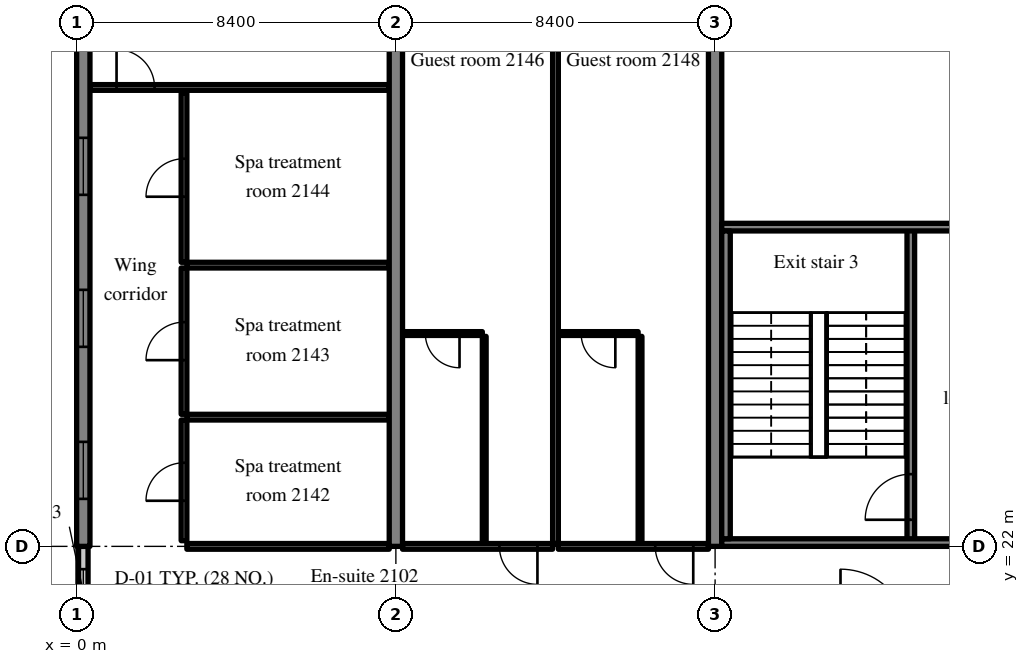
"""IFC4 building model, lengths in metres.
Left out: names, types, materials, properties, quantities, classifications, styles, units other than length and angle.
Written with IfcOpenShell. Run it as: python <this file> out.ifc"""

import sys

from ifc_helpers import new_model, si_unit, direction, frame, frame_2d, origin, place, context, subcontext, project, spatial, rectangle, extrude, source, transform, mapped, element, fill, save


model = new_model("IFC4")
c1 = context("Model", 3, precision=1e-05, world=origin(), true_north=direction((0.0, 1.0)))
c2 = subcontext(c1, "Body", "Model", "MODEL_VIEW")
j1 = project(units=[si_unit("LENGTHUNIT", "METRE"), si_unit("PLANEANGLEUNIT", "RADIAN")], contexts=[c1])
p1 = place(None, origin())
s1 = spatial("IfcSite", under=j1, at=p1, CompositionType="ELEMENT")
p2 = place(p1, origin())
s2 = spatial("IfcBuilding", under=s1, at=p2, CompositionType="ELEMENT")
p3 = place(p2, frame((0.0, 0.0, 91.4)))
s3 = spatial("IfcBuildingStorey", under=s2, at=p3, CompositionType="ELEMENT", Elevation=91.4)
m1 = source(origin(), c2, "Body", "SweptSolid", [
    extrude(rectangle(XDim=16.0, YDim=0.35, at=frame_2d((8.0, 0.0))), origin(), (0.0, 0.0, 1.0), 3.52),
])
p4 = place(p3, frame((0.175, 22.0, 0.0), z_axis=(0.0, 0.0, 1.0), x_axis=(0.0, 1.0, 0.0)))
e1 = element("IfcWall", 1, at=p4, inside=s3, PredefinedType="SHEAR", context=c2, shape_type="MappedRepresentation", body=[
    mapped(m1, transform((0.0, 0.0, 0.0), scale=1.0)),
])
m2 = source(origin(), c2, "Body", "SweptSolid", [
    extrude(rectangle(XDim=1.5, YDim=1.5, at=frame_2d((0.75, 0.75))), frame((0.0, 0.185, 0.0), z_axis=(0.0, -1.0, 0.0), x_axis=(1.0, 0.0, 0.0)), (0.0, 0.0, 1.0), 0.37),
])
p5 = place(p4, frame((1.25, 0.0, 0.9)))
e2 = element("IfcOpeningElement", 2, at=p5, cuts=e1, PredefinedType="OPENING", context=c2, shape_type="MappedRepresentation", body=[
    mapped(m2, transform((0.0, 0.0, 0.0), scale=1.0)),
])
p6 = place(p4, frame((5.25, 0.0, 0.9)))
e3 = element("IfcOpeningElement", 3, at=p6, cuts=e1, PredefinedType="OPENING", context=c2, shape_type="MappedRepresentation", body=[
    mapped(m2, transform((0.0, 0.0, 0.0), scale=1.0)),
])
p7 = place(p4, frame((9.25, 0.0, 0.9)))
e4 = element("IfcOpeningElement", 4, at=p7, cuts=e1, PredefinedType="OPENING", context=c2, shape_type="MappedRepresentation", body=[
    mapped(m2, transform((0.0, 0.0, 0.0), scale=1.0)),
])
p8 = place(p4, frame((13.25, 0.0, 0.9)))
e5 = element("IfcOpeningElement", 5, at=p8, cuts=e1, PredefinedType="OPENING", context=c2, shape_type="MappedRepresentation", body=[
    mapped(m2, transform((0.0, 0.0, 0.0), scale=1.0)),
])
m3 = source(origin(), c2, "Body", "SweptSolid", [
    extrude(rectangle(XDim=20.0, YDim=0.35, at=frame_2d((10.0, 0.0))), origin(), (0.0, 0.0, 1.0), 3.52),
])
for number, where, z_axis, x_axis in (
    (6, (8.4, 22.0, 0.0), (0.0, 0.0, 1.0), (0.0, 1.0, 0.0)),
    (7, (16.8, 22.0, 0.0), (0.0, 0.0, 1.0), (0.0, 1.0, 0.0)),
):
    element("IfcWall", number, at=place(p3, frame(where, z_axis=z_axis, x_axis=x_axis)), inside=s3, PredefinedType="SHEAR", context=c2, shape_type="MappedRepresentation", body=[
        mapped(m3, transform((0.0, 0.0, 0.0), scale=1.0)),
    ])
m4 = source(origin(), c2, "Body", "SweptSolid", [
    extrude(rectangle(XDim=2.4, YDim=0.25, at=frame_2d((1.2, 0.0))), origin(), (0.0, 0.0, 1.0), 2.62),
])
p9 = place(p3, frame((0.175, 19.6, 0.0), z_axis=(0.0, 0.0, 1.0), x_axis=(0.0, 1.0, 0.0)))
e8 = element("IfcWall", 8, at=p9, inside=s3, PredefinedType="SOLIDWALL", context=c2, shape_type="MappedRepresentation", body=[
    mapped(m4, transform((0.0, 0.0, 0.0), scale=1.0)),
])
m5 = source(origin(), c2, "Body", "SweptSolid", [
    extrude(rectangle(XDim=1.2, YDim=1.5, at=frame_2d((0.6, 0.75))), frame((0.0, 0.135, 0.0), z_axis=(0.0, -1.0, 0.0), x_axis=(1.0, 0.0, 0.0)), (0.0, 0.0, 1.0), 0.27),
])
p10 = place(p9, frame((0.6, 0.0, 0.9)))
e9 = element("IfcOpeningElement", 9, at=p10, cuts=e8, PredefinedType="OPENING", context=c2, shape_type="MappedRepresentation", body=[
    mapped(m5, transform((0.0, 0.0, 0.0), scale=1.0)),
])
m6 = source(origin(), c2, "Body", "SweptSolid", [
    extrude(rectangle(XDim=8.3, YDim=0.2, at=frame_2d((4.15, 0.0))), origin(), (0.0, 0.0, 1.0), 3.52),
])
p11 = place(p3, frame((21.95, 22.1, 0.0), z_axis=(0.0, 0.0, 1.0), x_axis=(0.0, 1.0, 0.0)))
e10 = element("IfcWall", 10, at=p11, inside=s3, PredefinedType="SOLIDWALL", context=c2, shape_type="MappedRepresentation", body=[
    mapped(m6, transform((0.0, 0.0, 0.0), scale=1.0)),
])
m7 = source(origin(), c2, "Body", "SweptSolid", [
    extrude(rectangle(XDim=1.2, YDim=2.1, at=frame_2d((0.6, 1.05))), frame((0.0, 0.11, 0.0), z_axis=(0.0, -1.0, 0.0), x_axis=(1.0, 0.0, 0.0)), (0.0, 0.0, 1.0), 0.22),
])
p12 = place(p11, frame((0.6, 0.0, 0.0)))
e11 = element("IfcOpeningElement", 11, at=p12, cuts=e10, PredefinedType="OPENING", context=c2, shape_type="MappedRepresentation", body=[
    mapped(m7, transform((0.0, 0.0, 0.0), scale=1.0)),
])
m8 = source(origin(), c2, "Body", "SweptSolid", [
    extrude(rectangle(XDim=8.225, YDim=0.2, at=frame_2d((4.112, 0.0))), origin(), (0.0, 0.0, 1.0), 3.52),
])
p13 = place(p3, frame((16.975, 22.1, 0.0), z_axis=(0.0, 0.0, 1.0), x_axis=(1.0, 0.0, 0.0)))
e12 = element("IfcWall", 12, at=p13, inside=s3, PredefinedType="SOLIDWALL", context=c2, shape_type="MappedRepresentation", body=[
    mapped(m8, transform((0.0, 0.0, 0.0), scale=1.0)),
])
p14 = place(p13, frame((6.025, 0.0, 0.0)))
e13 = element("IfcOpeningElement", 13, at=p14, cuts=e12, PredefinedType="OPENING", context=c2, shape_type="MappedRepresentation", body=[
    mapped(m7, transform((0.0, 0.0, 0.0), scale=1.0)),
])
p15 = place(p3, frame((16.975, 30.4, 0.0), z_axis=(0.0, 0.0, 1.0), x_axis=(1.0, 0.0, 0.0)))
e14 = element("IfcWall", 14, at=p15, inside=s3, PredefinedType="SOLIDWALL", context=c2, shape_type="MappedRepresentation", body=[
    mapped(m8, transform((0.0, 0.0, 0.0), scale=1.0)),
])
m9 = source(origin(), c2, "Body", "SweptSolid", [
    extrude(rectangle(XDim=1.0, YDim=2.1, at=frame_2d((0.5, 1.05))), frame((0.0, 0.11, 0.0), z_axis=(0.0, -1.0, 0.0), x_axis=(1.0, 0.0, 0.0)), (0.0, 0.0, 1.0), 0.22),
])
p16 = place(p15, frame((6.125, 0.0, 0.0)))
e15 = element("IfcOpeningElement", 15, at=p16, cuts=e14, PredefinedType="OPENING", context=c2, shape_type="MappedRepresentation", body=[
    mapped(m9, transform((0.0, 0.0, 0.0), scale=1.0)),
])
m10 = source(origin(), c2, "Body", "SweptSolid", [
    extrude(rectangle(XDim=8.1, YDim=0.225, at=frame_2d((4.05, 0.0))), origin(), (0.0, 0.0, 1.0), 3.52),
])
p17 = place(p3, frame((17.087, 22.2, 0.0), z_axis=(0.0, 0.0, 1.0), x_axis=(0.0, 1.0, 0.0)))
e16 = element("IfcWall", 16, at=p17, inside=s3, PredefinedType="SOLIDWALL", context=c2, shape_type="MappedRepresentation", body=[
    mapped(m10, transform((0.0, 0.0, 0.0), scale=1.0)),
])
m11 = source(origin(), c2, "Body", "SweptSolid", [
    extrude(rectangle(XDim=5.325, YDim=0.15, at=frame_2d((2.663, 0.0))), origin(), (0.0, 0.0, 1.0), 2.82),
])
p18 = place(p3, frame((2.9, 22.0, 0.0), z_axis=(0.0, 0.0, 1.0), x_axis=(1.0, 0.0, 0.0)))
e17 = element("IfcWall", 17, at=p18, inside=s3, PredefinedType="PARTITIONING", context=c2, shape_type="MappedRepresentation", body=[
    mapped(m11, transform((0.0, 0.0, 0.0), scale=1.0)),
])
m12 = source(origin(), c2, "Body", "SweptSolid", [
    extrude(rectangle(XDim=3.175, YDim=0.15, at=frame_2d((1.587, 0.0))), origin(), (0.0, 0.0, 1.0), 3.52),
])
p19 = place(p3, frame((2.825, 22.15, 0.0), z_axis=(0.0, 0.0, 1.0), x_axis=(0.0, 1.0, 0.0)))
e18 = element("IfcWall", 18, at=p19, inside=s3, PredefinedType="PARTITIONING", context=c2, shape_type="MappedRepresentation", body=[
    mapped(m12, transform((0.0, 0.0, 0.0), scale=1.0)),
])
m13 = source(origin(), c2, "Body", "SweptSolid", [
    extrude(rectangle(XDim=1.0, YDim=2.1, at=frame_2d((0.5, 1.05))), frame((0.0, 0.085, 0.0), z_axis=(0.0, -1.0, 0.0), x_axis=(1.0, 0.0, 0.0)), (0.0, 0.0, 1.0), 0.17),
])
p20 = place(p19, frame((1.05, 0.0, 0.0)))
e19 = element("IfcOpeningElement", 19, at=p20, cuts=e18, PredefinedType="OPENING", context=c2, shape_type="MappedRepresentation", body=[
    mapped(m13, transform((0.0, 0.0, 0.0), scale=1.0)),
])
m14 = source(origin(), c2, "Body", "SweptSolid", [
    extrude(rectangle(XDim=5.325, YDim=0.15, at=frame_2d((2.663, 0.0))), origin(), (0.0, 0.0, 1.0), 3.52),
])
p21 = place(p3, frame((2.9, 25.4, 0.0), z_axis=(0.0, 0.0, 1.0), x_axis=(1.0, 0.0, 0.0)))
e20 = element("IfcWall", 20, at=p21, inside=s3, PredefinedType="PARTITIONING", context=c2, shape_type="MappedRepresentation", body=[
    mapped(m14, transform((0.0, 0.0, 0.0), scale=1.0)),
])
m15 = source(origin(), c2, "Body", "SweptSolid", [
    extrude(rectangle(XDim=3.85, YDim=0.15, at=frame_2d((1.925, 0.0))), origin(), (0.0, 0.0, 1.0), 3.52),
])
p22 = place(p3, frame((2.825, 25.475, 0.0), z_axis=(0.0, 0.0, 1.0), x_axis=(0.0, 1.0, 0.0)))
e21 = element("IfcWall", 21, at=p22, inside=s3, PredefinedType="PARTITIONING", context=c2, shape_type="MappedRepresentation", body=[
    mapped(m15, transform((0.0, 0.0, 0.0), scale=1.0)),
])
p23 = place(p22, frame((1.425, 0.0, 0.0)))
e22 = element("IfcOpeningElement", 22, at=p23, cuts=e21, PredefinedType="OPENING", context=c2, shape_type="MappedRepresentation", body=[
    mapped(m13, transform((0.0, 0.0, 0.0), scale=1.0)),
])
p24 = place(p3, frame((2.9, 29.4, 0.0), z_axis=(0.0, 0.0, 1.0), x_axis=(1.0, 0.0, 0.0)))
e23 = element("IfcWall", 23, at=p24, inside=s3, PredefinedType="PARTITIONING", context=c2, shape_type="MappedRepresentation", body=[
    mapped(m14, transform((0.0, 0.0, 0.0), scale=1.0)),
])
m16 = source(origin(), c2, "Body", "SweptSolid", [
    extrude(rectangle(XDim=4.45, YDim=0.15, at=frame_2d((2.225, 0.0))), origin(), (0.0, 0.0, 1.0), 3.52),
])
p25 = place(p3, frame((2.825, 29.475, 0.0), z_axis=(0.0, 0.0, 1.0), x_axis=(0.0, 1.0, 0.0)))
e24 = element("IfcWall", 24, at=p25, inside=s3, PredefinedType="PARTITIONING", context=c2, shape_type="MappedRepresentation", body=[
    mapped(m16, transform((0.0, 0.0, 0.0), scale=1.0)),
])
p26 = place(p25, frame((1.725, 0.0, 0.0)))
e25 = element("IfcOpeningElement", 25, at=p26, cuts=e24, PredefinedType="OPENING", context=c2, shape_type="MappedRepresentation", body=[
    mapped(m13, transform((0.0, 0.0, 0.0), scale=1.0)),
])
m17 = source(origin(), c2, "Body", "SweptSolid", [
    extrude(rectangle(XDim=7.875, YDim=0.15, at=frame_2d((3.938, 0.0))), origin(), (0.0, 0.0, 1.0), 3.52),
])
p27 = place(p3, frame((0.35, 34.075, 0.0), z_axis=(0.0, 0.0, 1.0), x_axis=(1.0, 0.0, 0.0)))
e26 = element("IfcWall", 26, at=p27, inside=s3, PredefinedType="PARTITIONING", context=c2, shape_type="MappedRepresentation", body=[
    mapped(m17, transform((0.0, 0.0, 0.0), scale=1.0)),
])
p28 = place(p27, frame((0.7, 0.0, 0.0)))
e27 = element("IfcOpeningElement", 27, at=p28, cuts=e26, PredefinedType="OPENING", context=c2, shape_type="MappedRepresentation", body=[
    mapped(m13, transform((0.0, 0.0, 0.0), scale=1.0)),
])
m18 = source(origin(), c2, "Body", "SweptSolid", [
    extrude(rectangle(XDim=5.45, YDim=0.1, at=frame_2d((2.725, 0.0))), origin(), (0.0, 0.0, 1.0), 3.52),
])
p29 = place(p3, frame((10.725, 22.075, 0.0), z_axis=(0.0, 0.0, 1.0), x_axis=(0.0, 1.0, 0.0)))
e28 = element("IfcWall", 28, at=p29, inside=s3, PredefinedType="PARTITIONING", context=c2, shape_type="MappedRepresentation", body=[
    mapped(m18, transform((0.0, 0.0, 0.0), scale=1.0)),
])
m19 = source(origin(), c2, "Body", "SweptSolid", [
    extrude(rectangle(XDim=2.1, YDim=0.1, at=frame_2d((1.05, 0.0))), origin(), (0.0, 0.0, 1.0), 3.52),
])
p30 = place(p3, frame((8.575, 27.6, 0.0), z_axis=(0.0, 0.0, 1.0), x_axis=(1.0, 0.0, 0.0)))
e29 = element("IfcWall", 29, at=p30, inside=s3, PredefinedType="PARTITIONING", context=c2, shape_type="MappedRepresentation", body=[
    mapped(m19, transform((0.0, 0.0, 0.0), scale=1.0)),
])
m20 = source(origin(), c2, "Body", "SweptSolid", [
    extrude(rectangle(XDim=0.9, YDim=2.1, at=frame_2d((0.45, 1.05))), frame((0.0, 0.06, 0.0), z_axis=(0.0, -1.0, 0.0), x_axis=(1.0, 0.0, 0.0)), (0.0, 0.0, 1.0), 0.12),
])
p31 = place(p30, frame((0.6, 0.0, 0.0)))
e30 = element("IfcOpeningElement", 30, at=p31, cuts=e29, PredefinedType="OPENING", context=c2, shape_type="MappedRepresentation", body=[
    mapped(m20, transform((0.0, 0.0, 0.0), scale=1.0)),
])
m21 = source(origin(), c2, "Body", "SweptSolid", [
    extrude(rectangle(XDim=3.95, YDim=0.15, at=frame_2d((1.975, 0.0))), origin(), (0.0, 0.0, 1.0), 2.82),
])
p32 = place(p3, frame((8.575, 22.0, 0.0), z_axis=(0.0, 0.0, 1.0), x_axis=(1.0, 0.0, 0.0)))
e31 = element("IfcWall", 31, at=p32, inside=s3, PredefinedType="PARTITIONING", context=c2, shape_type="MappedRepresentation", body=[
    mapped(m21, transform((0.0, 0.0, 0.0), scale=1.0)),
])
p33 = place(p32, frame((2.55, 0.0, 0.0)))
e32 = element("IfcOpeningElement", 32, at=p33, cuts=e31, PredefinedType="OPENING", context=c2, shape_type="MappedRepresentation", body=[
    mapped(m13, transform((0.0, 0.0, 0.0), scale=1.0)),
])
p34 = place(p3, frame((14.825, 22.075, 0.0), z_axis=(0.0, 0.0, 1.0), x_axis=(0.0, 1.0, 0.0)))
e33 = element("IfcWall", 33, at=p34, inside=s3, PredefinedType="PARTITIONING", context=c2, shape_type="MappedRepresentation", body=[
    mapped(m18, transform((0.0, 0.0, 0.0), scale=1.0)),
])
m22 = source(origin(), c2, "Body", "SweptSolid", [
    extrude(rectangle(XDim=2.1, YDim=0.1, at=frame_2d((1.05, 0.0))), origin(), (0.0, 0.0, 1.0), 3.52),
])
p35 = place(p3, frame((12.675, 27.6, 0.0), z_axis=(0.0, 0.0, 1.0), x_axis=(1.0, 0.0, 0.0)))
e34 = element("IfcWall", 34, at=p35, inside=s3, PredefinedType="PARTITIONING", context=c2, shape_type="MappedRepresentation", body=[
    mapped(m22, transform((0.0, 0.0, 0.0), scale=1.0)),
])
p36 = place(p35, frame((0.6, 0.0, 0.0)))
e35 = element("IfcOpeningElement", 35, at=p36, cuts=e34, PredefinedType="OPENING", context=c2, shape_type="MappedRepresentation", body=[
    mapped(m20, transform((0.0, 0.0, 0.0), scale=1.0)),
])
p37 = place(p3, frame((12.675, 22.0, 0.0), z_axis=(0.0, 0.0, 1.0), x_axis=(1.0, 0.0, 0.0)))
e36 = element("IfcWall", 36, at=p37, inside=s3, PredefinedType="PARTITIONING", context=c2, shape_type="MappedRepresentation", body=[
    mapped(m21, transform((0.0, 0.0, 0.0), scale=1.0)),
])
p38 = place(p37, frame((2.55, 0.0, 0.0)))
e37 = element("IfcOpeningElement", 37, at=p38, cuts=e36, PredefinedType="OPENING", context=c2, shape_type="MappedRepresentation", body=[
    mapped(m13, transform((0.0, 0.0, 0.0), scale=1.0)),
])
m23 = source(origin(), c2, "Body", "SweptSolid", [
    extrude(rectangle(XDim=19.225, YDim=0.15, at=frame_2d((9.613, 0.0))), origin(), (0.0, 0.0, 1.0), 3.52),
])
p39 = place(p3, frame((12.6, 22.075, 0.0), z_axis=(0.0, 0.0, 1.0), x_axis=(0.0, 1.0, 0.0)))
e38 = element("IfcWall", 38, at=p39, inside=s3, PredefinedType="PARTITIONING", context=c2, shape_type="MappedRepresentation", body=[
    mapped(m23, transform((0.0, 0.0, 0.0), scale=1.0)),
])
m24 = source(origin(), c2, "Body", "SweptSolid", [
    extrude(rectangle(XDim=1.5, YDim=1.5, at=frame_2d((0.75, 0.75))), frame((0.0, 0.03, 0.0), z_axis=(0.0, -1.0, 0.0), x_axis=(1.0, 0.0, 0.0)), (0.0, 0.0, 1.0), 0.06),
])
p40 = place(p5, origin())
e39 = element("IfcWindow", 39, at=p40, inside=s3, PartitioningType="SINGLE_PANEL", PredefinedType="WINDOW", context=c2, shape_type="MappedRepresentation", body=[
    mapped(m24, transform((0.0, 0.0, 0.0), scale=1.0)),
])
fill(e2, e39)
p41 = place(p6, origin())
e40 = element("IfcWindow", 40, at=p41, inside=s3, PartitioningType="SINGLE_PANEL", PredefinedType="WINDOW", context=c2, shape_type="MappedRepresentation", body=[
    mapped(m24, transform((0.0, 0.0, 0.0), scale=1.0)),
])
fill(e3, e40)
p42 = place(p7, origin())
e41 = element("IfcWindow", 41, at=p42, inside=s3, PartitioningType="SINGLE_PANEL", PredefinedType="WINDOW", context=c2, shape_type="MappedRepresentation", body=[
    mapped(m24, transform((0.0, 0.0, 0.0), scale=1.0)),
])
fill(e4, e41)
m25 = source(origin(), c2, "Body", "SweptSolid", [
    extrude(rectangle(XDim=1.2, YDim=1.5, at=frame_2d((0.6, 0.75))), frame((0.0, 0.03, 0.0), z_axis=(0.0, -1.0, 0.0), x_axis=(1.0, 0.0, 0.0)), (0.0, 0.0, 1.0), 0.06),
])
p43 = place(p10, origin())
e42 = element("IfcWindow", 42, at=p43, inside=s3, PartitioningType="SINGLE_PANEL", PredefinedType="WINDOW", context=c2, shape_type="MappedRepresentation", body=[
    mapped(m25, transform((0.0, 0.0, 0.0), scale=1.0)),
])
fill(e9, e42)
m26 = source(origin(), c2, "Body", "SweptSolid", [
    extrude(rectangle(XDim=1.2, YDim=2.1, at=frame_2d((0.6, 1.05))), frame((0.0, 0.025, 0.0), z_axis=(0.0, -1.0, 0.0), x_axis=(1.0, 0.0, 0.0)), (0.0, 0.0, 1.0), 0.05),
])
p44 = place(p12, origin())
e43 = element("IfcDoor", 43, at=p44, inside=s3, OperationType="SINGLE_SWING_LEFT", PredefinedType="DOOR", context=c2, shape_type="MappedRepresentation", body=[
    mapped(m26, transform((0.0, 0.0, 0.0), scale=1.0)),
])
fill(e11, e43)
m27 = source(origin(), c2, "Body", "SweptSolid", [
    extrude(rectangle(XDim=1.0, YDim=2.1, at=frame_2d((0.5, 1.05))), frame((0.0, 0.025, 0.0), z_axis=(0.0, -1.0, 0.0), x_axis=(1.0, 0.0, 0.0)), (0.0, 0.0, 1.0), 0.05),
])
p45 = place(p20, origin())
e44 = element("IfcDoor", 44, at=p45, inside=s3, OperationType="SINGLE_SWING_LEFT", PredefinedType="DOOR", context=c2, shape_type="MappedRepresentation", body=[
    mapped(m27, transform((0.0, 0.0, 0.0), scale=1.0)),
])
fill(e19, e44)
p46 = place(p23, origin())
e45 = element("IfcDoor", 45, at=p46, inside=s3, OperationType="SINGLE_SWING_LEFT", PredefinedType="DOOR", context=c2, shape_type="MappedRepresentation", body=[
    mapped(m27, transform((0.0, 0.0, 0.0), scale=1.0)),
])
fill(e22, e45)
p47 = place(p26, origin())
e46 = element("IfcDoor", 46, at=p47, inside=s3, OperationType="SINGLE_SWING_LEFT", PredefinedType="DOOR", context=c2, shape_type="MappedRepresentation", body=[
    mapped(m27, transform((0.0, 0.0, 0.0), scale=1.0)),
])
fill(e25, e46)
p48 = place(p28, origin())
e47 = element("IfcDoor", 47, at=p48, inside=s3, OperationType="SINGLE_SWING_LEFT", PredefinedType="DOOR", context=c2, shape_type="MappedRepresentation", body=[
    mapped(m27, transform((0.0, 0.0, 0.0), scale=1.0)),
])
fill(e27, e47)
m28 = source(origin(), c2, "Body", "SweptSolid", [
    extrude(rectangle(XDim=0.9, YDim=2.1, at=frame_2d((0.45, 1.05))), frame((0.0, 0.025, 0.0), z_axis=(0.0, -1.0, 0.0), x_axis=(1.0, 0.0, 0.0)), (0.0, 0.0, 1.0), 0.05),
])
p49 = place(p31, origin())
e48 = element("IfcDoor", 48, at=p49, inside=s3, OperationType="SINGLE_SWING_RIGHT", PredefinedType="DOOR", context=c2, shape_type="MappedRepresentation", body=[
    mapped(m28, transform((0.0, 0.0, 0.0), scale=1.0)),
])
fill(e30, e48)
p50 = place(p33, origin())
e49 = element("IfcDoor", 49, at=p50, inside=s3, OperationType="SINGLE_SWING_RIGHT", PredefinedType="DOOR", context=c2, shape_type="MappedRepresentation", body=[
    mapped(m27, transform((0.0, 0.0, 0.0), scale=1.0)),
])
fill(e32, e49)
p51 = place(p36, origin())
e50 = element("IfcDoor", 50, at=p51, inside=s3, OperationType="SINGLE_SWING_RIGHT", PredefinedType="DOOR", context=c2, shape_type="MappedRepresentation", body=[
    mapped(m28, transform((0.0, 0.0, 0.0), scale=1.0)),
])
fill(e35, e50)
p52 = place(p38, origin())
e51 = element("IfcDoor", 51, at=p52, inside=s3, OperationType="SINGLE_SWING_RIGHT", PredefinedType="DOOR", context=c2, shape_type="MappedRepresentation", body=[
    mapped(m27, transform((0.0, 0.0, 0.0), scale=1.0)),
])
fill(e37, e51)
save(model, sys.argv[1])
